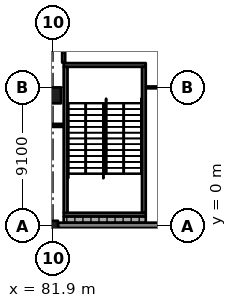
"""IFC4 building model, lengths in metres.
Left out: names, types, materials, properties, quantities, classifications, styles, units other than length and angle.
Written with IfcOpenShell. Run it as: python <this file> out.ifc"""

import sys

from ifc_helpers import new_model, si_unit, direction, frame, frame_2d, origin, origin_2d, place, context, subcontext, project, spatial, rectangle, extrude, element, fill, save


model = new_model("IFC4")
c1 = context("Model", 3, precision=1e-05, world=origin(), true_north=direction((0.0, 1.0)))
c2 = subcontext(c1, "Body", "Model", "MODEL_VIEW")
j1 = project(units=[si_unit("LENGTHUNIT", "METRE"), si_unit("PLANEANGLEUNIT", "RADIAN")], contexts=[c1])
p1 = place(None, origin())
s1 = spatial("IfcSite", under=j1, at=p1, CompositionType="ELEMENT")
p2 = place(p1, origin())
s2 = spatial("IfcBuilding", under=s1, at=p2, CompositionType="ELEMENT")
p3 = place(p2, origin())
s3 = spatial("IfcBuildingStorey", under=s2, at=p3, CompositionType="ELEMENT", Elevation=0.0)
p4 = place(p3, frame((81.9, 0.0, -0.4), z_axis=(0.0, 0.0, 1.0), x_axis=(1.0, 0.0, 0.0)))
e1 = element("IfcColumn", 1, at=p4, inside=s3, PredefinedType="COLUMN", context=c2, shape_type="SweptSolid", body=[
    extrude(rectangle(XDim=0.65, YDim=0.65, at=origin_2d()), origin(), (0.0, 0.0, 1.0), 6.77),
])
p5 = place(p3, frame((81.9, 8.575, -0.4), z_axis=(0.0, 0.0, 1.0), x_axis=(1.0, 0.0, 0.0)))
e2 = element("IfcColumn", 2, at=p5, inside=s3, PredefinedType="COLUMN", context=c2, shape_type="SweptSolid", body=[
    extrude(rectangle(XDim=1.05, YDim=1.05, at=origin_2d()), origin(), (0.0, 0.0, 1.0), 6.77),
])
p6 = place(p3, frame((88.0, 0.725, -0.4), z_axis=(0.0, 0.0, 1.0), x_axis=(-1.0, 0.0, 0.0)))
e3 = element("IfcWall", 3, at=p6, inside=s3, PredefinedType="SHEAR", context=c2, shape_type="SweptSolid", body=[
    extrude(rectangle(XDim=5.4, YDim=0.25, at=frame_2d((2.7, 0.0))), origin(), (0.0, 0.0, 1.0), 6.77),
])
p7 = place(p3, frame((88.0, 10.575, -0.4), z_axis=(0.0, 0.0, 1.0), x_axis=(-1.0, 0.0, 0.0)))
e4 = element("IfcWall", 4, at=p7, inside=s3, PredefinedType="SHEAR", context=c2, shape_type="SweptSolid", body=[
    extrude(rectangle(XDim=5.4, YDim=0.25, at=frame_2d((2.7, 0.0))), origin(), (0.0, 0.0, 1.0), 6.77),
])
p8 = place(p7, frame((1.5, 0.0, 0.4)))
e5 = element("IfcOpeningElement", 5, at=p8, cuts=e4, PredefinedType="OPENING", context=c2, shape_type="SweptSolid", body=[
    extrude(rectangle(XDim=2.4, YDim=2.1, at=frame_2d((1.2, 1.05))), frame((0.0, 0.135, 0.0), z_axis=(0.0, -1.0, 0.0), x_axis=(1.0, 0.0, 0.0)), (0.0, 0.0, 1.0), 0.27),
])
for number, where, z_axis, x_axis in (
    (6, (82.725, 10.45, -0.4), (0.0, 0.0, 1.0), (0.0, -1.0, 0.0)),
    (7, (87.875, 10.45, -0.4), (0.0, 0.0, 1.0), (0.0, -1.0, 0.0)),
):
    element("IfcWall", number, at=place(p3, frame(where, z_axis=z_axis, x_axis=x_axis)), inside=s3, PredefinedType="SHEAR", context=c2, shape_type="SweptSolid", body=[
        extrude(rectangle(XDim=9.6, YDim=0.25, at=frame_2d((4.8, 0.0))), origin(), (0.0, 0.0, 1.0), 6.77),
    ])
p9 = place(p3, frame((82.225, 0.025, 0.0), z_axis=(0.0, 0.0, 1.0), x_axis=(1.0, 0.0, 0.0)))
e8 = element("IfcWall", 8, at=p9, inside=s3, PredefinedType="SOLIDWALL", context=c2, shape_type="SweptSolid", body=[
    extrude(rectangle(XDim=8.425, YDim=0.35, at=frame_2d((4.212, 0.0))), origin(), (0.0, 0.0, 1.0), 5.27),
])
p10 = place(p3, frame((82.6, 0.4, 0.0), z_axis=(0.0, 0.0, 1.0), x_axis=(1.0, 0.0, 0.0)))
e9 = element("IfcWall", 9, at=p10, inside=s3, PredefinedType="SOLIDWALL", context=c2, shape_type="SweptSolid", body=[
    extrude(rectangle(XDim=5.4, YDim=0.4, at=frame_2d((2.7, 0.0))), origin(), (0.0, 0.0, 1.0), 6.02),
])
p11 = place(p3, frame((82.57, 6.6, 0.0), z_axis=(0.0, 0.0, 1.0), x_axis=(-1.0, 0.0, 0.0)))
e10 = element("IfcWall", 10, at=p11, inside=s3, PredefinedType="PARTITIONING", context=c2, shape_type="SweptSolid", body=[
    extrude(rectangle(XDim=21.84, YDim=0.2, at=frame_2d((10.92, 0.0))), origin(), (0.0, 0.0, 1.0), 6.02),
])
p12 = place(p11, frame((0.65, 0.0, 0.0)))
e11 = element("IfcOpeningElement", 11, at=p12, cuts=e10, PredefinedType="OPENING", context=c2, shape_type="SweptSolid", body=[
    extrude(rectangle(XDim=1.8, YDim=2.4, at=frame_2d((0.9, 1.2))), frame((0.0, 0.11, 0.0), z_axis=(0.0, -1.0, 0.0), x_axis=(1.0, 0.0, 0.0)), (0.0, 0.0, 1.0), 0.22),
])
p13 = place(p11, frame((3.75, 0.0, 0.0)))
e12 = element("IfcOpeningElement", 12, at=p13, cuts=e10, PredefinedType="OPENING", context=c2, shape_type="SweptSolid", body=[
    extrude(rectangle(XDim=1.8, YDim=2.4, at=frame_2d((0.9, 1.2))), frame((0.0, 0.11, 0.0), z_axis=(0.0, -1.0, 0.0), x_axis=(1.0, 0.0, 0.0)), (0.0, 0.0, 1.0), 0.22),
])
p14 = place(p11, frame((6.95, 0.0, 0.0)))
e13 = element("IfcOpeningElement", 13, at=p14, cuts=e10, PredefinedType="OPENING", context=c2, shape_type="SweptSolid", body=[
    extrude(rectangle(XDim=1.8, YDim=2.4, at=frame_2d((0.9, 1.2))), frame((0.0, 0.11, 0.0), z_axis=(0.0, -1.0, 0.0), x_axis=(1.0, 0.0, 0.0)), (0.0, 0.0, 1.0), 0.22),
])
p15 = place(p11, frame((10.05, 0.0, 0.0)))
e14 = element("IfcOpeningElement", 14, at=p15, cuts=e10, PredefinedType="OPENING", context=c2, shape_type="SweptSolid", body=[
    extrude(rectangle(XDim=1.8, YDim=2.4, at=frame_2d((0.9, 1.2))), frame((0.0, 0.11, 0.0), z_axis=(0.0, -1.0, 0.0), x_axis=(1.0, 0.0, 0.0)), (0.0, 0.0, 1.0), 0.22),
])
p16 = place(p11, frame((13.15, 0.0, 0.0)))
e15 = element("IfcOpeningElement", 15, at=p16, cuts=e10, PredefinedType="OPENING", context=c2, shape_type="SweptSolid", body=[
    extrude(rectangle(XDim=1.8, YDim=2.4, at=frame_2d((0.9, 1.2))), frame((0.0, 0.11, 0.0), z_axis=(0.0, -1.0, 0.0), x_axis=(1.0, 0.0, 0.0)), (0.0, 0.0, 1.0), 0.22),
])
p17 = place(p11, frame((16.25, 0.0, 0.0)))
e16 = element("IfcOpeningElement", 16, at=p17, cuts=e10, PredefinedType="OPENING", context=c2, shape_type="SweptSolid", body=[
    extrude(rectangle(XDim=1.8, YDim=2.4, at=frame_2d((0.9, 1.2))), frame((0.0, 0.11, 0.0), z_axis=(0.0, -1.0, 0.0), x_axis=(1.0, 0.0, 0.0)), (0.0, 0.0, 1.0), 0.22),
])
p18 = place(p11, frame((19.35, 0.0, 0.0)))
e17 = element("IfcOpeningElement", 17, at=p18, cuts=e10, PredefinedType="OPENING", context=c2, shape_type="SweptSolid", body=[
    extrude(rectangle(XDim=1.8, YDim=2.4, at=frame_2d((0.9, 1.2))), frame((0.0, 0.11, 0.0), z_axis=(0.0, -1.0, 0.0), x_axis=(1.0, 0.0, 0.0)), (0.0, 0.0, 1.0), 0.22),
])
p19 = place(p3, frame((82.6, 18.1, 0.0), z_axis=(0.0, 0.0, 1.0), x_axis=(0.0, -1.0, 0.0)))
e18 = element("IfcWall", 18, at=p19, inside=s3, PredefinedType="PARTITIONING", context=c2, shape_type="SweptSolid", body=[
    extrude(rectangle(XDim=7.37, YDim=0.2, at=frame_2d((3.685, 0.0))), origin(), (0.0, 0.0, 1.0), 6.02),
])
p20 = place(p19, frame((2.15, 0.0, 0.0)))
e19 = element("IfcOpeningElement", 19, at=p20, cuts=e18, PredefinedType="OPENING", context=c2, shape_type="SweptSolid", body=[
    extrude(rectangle(XDim=3.0, YDim=2.4, at=frame_2d((1.5, 1.2))), frame((0.0, 0.11, 0.0), z_axis=(0.0, -1.0, 0.0), x_axis=(1.0, 0.0, 0.0)), (0.0, 0.0, 1.0), 0.22),
])
p21 = place(p3, frame((90.45, 9.1, 0.0), z_axis=(0.0, 0.0, 1.0), x_axis=(-1.0, 0.0, 0.0)))
e20 = element("IfcWall", 20, at=p21, inside=s3, PredefinedType="PARTITIONING", context=c2, shape_type="SweptSolid", body=[
    extrude(rectangle(XDim=2.42, YDim=0.125, at=frame_2d((1.21, 0.0))), origin(), (0.0, 0.0, 1.0), 5.57),
])
p22 = place(p12, origin())
e21 = element("IfcDoor", 21, at=p22, inside=s3, OperationType="DOUBLE_DOOR_SINGLE_SWING", PredefinedType="DOOR", context=c2, shape_type="SweptSolid", body=[
    extrude(rectangle(XDim=1.8, YDim=2.4, at=frame_2d((0.9, 1.2))), frame((0.0, 0.025, 0.0), z_axis=(0.0, -1.0, 0.0), x_axis=(1.0, 0.0, 0.0)), (0.0, 0.0, 1.0), 0.05),
])
fill(e11, e21)
p23 = place(p8, origin())
e22 = element("IfcDoor", 22, at=p23, inside=s3, OperationType="DOUBLE_DOOR_SINGLE_SWING", PredefinedType="DOOR", context=c2, shape_type="SweptSolid", body=[
    extrude(rectangle(XDim=2.4, YDim=2.1, at=frame_2d((1.2, 1.05))), frame((0.0, 0.025, 0.0), z_axis=(0.0, -1.0, 0.0), x_axis=(1.0, 0.0, 0.0)), (0.0, 0.0, 1.0), 0.05),
])
fill(e5, e22)
save(model, sys.argv[1])
